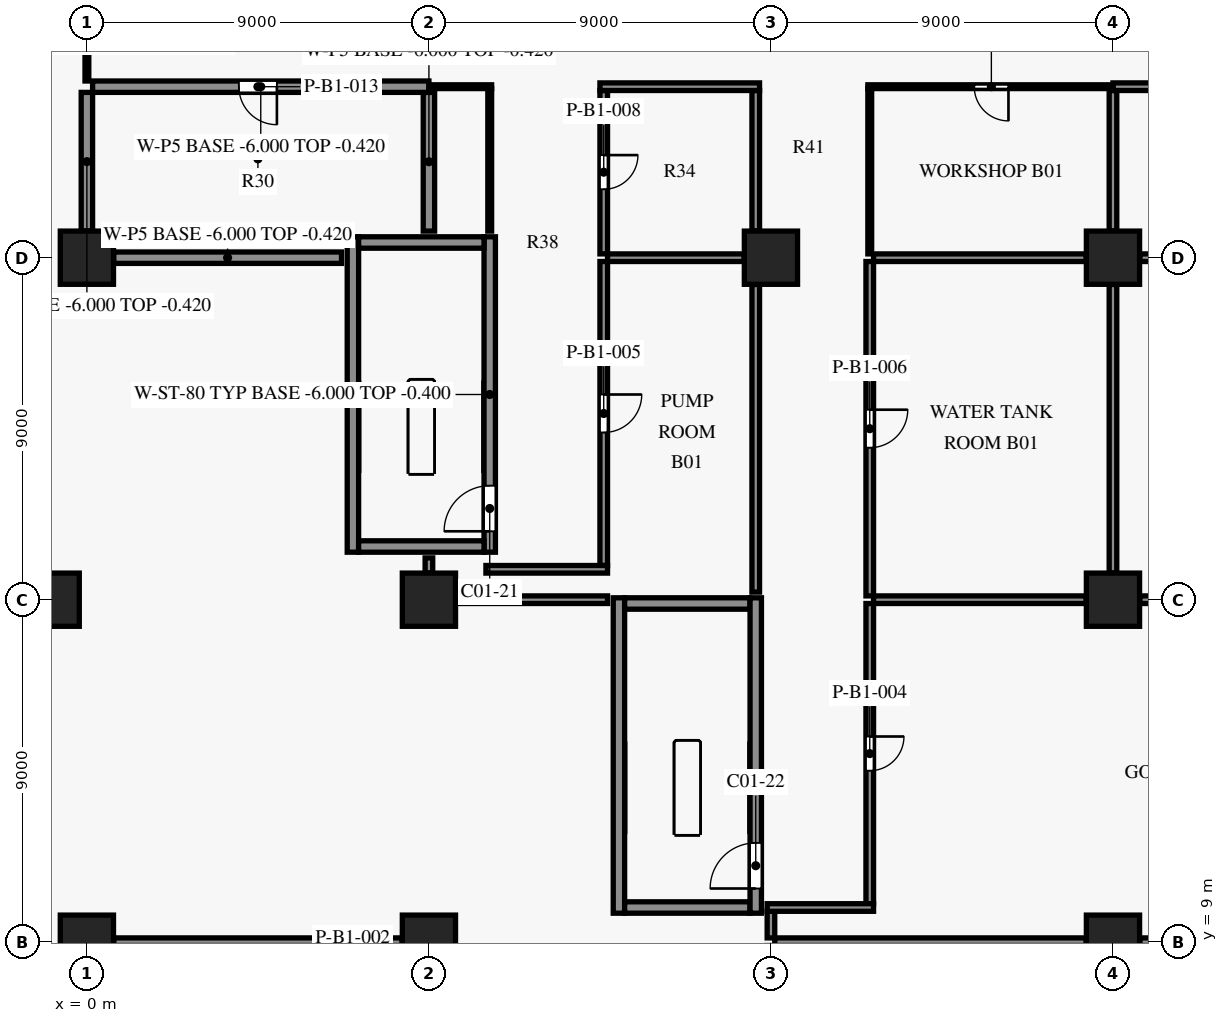
"""IFC4 building model, lengths in metres.
Left out: names, types, materials, properties, quantities, classifications, styles, units other than length and angle.
Written with IfcOpenShell. Run it as: python <this file> out.ifc"""

import sys

from ifc_helpers import new_model, si_unit, direction, frame, frame_2d, origin, origin_2d, place, context, subcontext, project, spatial, rectangle, extrude, element, fill, save


model = new_model("IFC4")
c1 = context("Model", 3, precision=1e-05, world=origin(), true_north=direction((0.0, 1.0)))
c2 = subcontext(c1, "Body", "Model", "MODEL_VIEW")
j1 = project(units=[si_unit("LENGTHUNIT", "METRE"), si_unit("PLANEANGLEUNIT", "RADIAN")], contexts=[c1])
p1 = place(None, origin())
s1 = spatial("IfcSite", under=j1, at=p1, CompositionType="ELEMENT")
p2 = place(p1, origin())
s2 = spatial("IfcBuilding", under=s1, at=p2, CompositionType="ELEMENT")
p3 = place(p2, frame((0.0, 0.0, -6.0)))
s3 = spatial("IfcBuildingStorey", under=s2, at=p3, CompositionType="ELEMENT", Elevation=-6.0)
for number, where, z_axis, x_axis in (
    (1, (27.0, 9.0, 0.0), (0.0, 0.0, 1.0), (1.0, 0.0, 0.0)),
    (2, (27.0, 18.0, 0.0), (0.0, 0.0, 1.0), (1.0, 0.0, 0.0)),
    (3, (27.0, 27.0, 0.0), (0.0, 0.0, 1.0), (1.0, 0.0, 0.0)),
    (4, (0.0, 27.0, 0.0), (0.0, 0.0, 1.0), (1.0, 0.0, 0.0)),
    (5, (-0.9, 18.0, 0.0), (0.0, 0.0, 1.0), (1.0, 0.0, 0.0)),
    (6, (0.0, 9.0, 0.0), (0.0, 0.0, 1.0), (1.0, 0.0, 0.0)),
    (7, (9.0, 9.0, 0.0), (0.0, 0.0, 1.0), (1.0, 0.0, 0.0)),
    (8, (9.0, 18.0, 0.0), (0.0, 0.0, 1.0), (1.0, 0.0, 0.0)),
    (9, (18.0, 27.0, 0.0), (0.0, 0.0, 1.0), (1.0, 0.0, 0.0)),
):
    element("IfcColumn", number, at=place(p3, frame(where, z_axis=z_axis, x_axis=x_axis)), inside=s3, PredefinedType="COLUMN", context=c2, shape_type="SweptSolid", body=[
        extrude(rectangle(XDim=1.4, YDim=1.4, at=origin_2d()), origin(), (0.0, 0.0, 1.0), 6.0),
    ])
for number, where, z_axis, x_axis in (
    (10, (14.15, 9.9, 0.0), (0.0, 0.0, 1.0), (1.0, 0.0, 0.0)),
    (11, (14.15, 17.9, 0.0), (0.0, 0.0, 1.0), (1.0, 0.0, 0.0)),
    (12, (7.15, 19.4, 0.0), (0.0, 0.0, 1.0), (1.0, 0.0, 0.0)),
    (13, (7.15, 27.4, 0.0), (0.0, 0.0, 1.0), (1.0, 0.0, 0.0)),
):
    element("IfcWall", number, at=place(p3, frame(where, z_axis=z_axis, x_axis=x_axis)), inside=s3, PredefinedType="SHEAR", context=c2, shape_type="SweptSolid", body=[
        extrude(rectangle(XDim=3.3, YDim=0.3, at=frame_2d((1.65, 0.0))), origin(), (0.0, 0.0, 1.0), 5.6),
    ])
p4 = place(p3, frame((7.0, 19.25, 0.0), z_axis=(0.0, 0.0, 1.0), x_axis=(0.0, 1.0, 0.0)))
e14 = element("IfcWall", 14, at=p4, inside=s3, PredefinedType="SHEAR", context=c2, shape_type="SweptSolid", body=[
    extrude(rectangle(XDim=8.3, YDim=0.3, at=frame_2d((4.15, 0.0))), origin(), (0.0, 0.0, 1.0), 5.6),
])
p5 = place(p3, frame((10.6, 19.25, 0.0), z_axis=(0.0, 0.0, 1.0), x_axis=(0.0, 1.0, 0.0)))
e15 = element("IfcWall", 15, at=p5, inside=s3, PredefinedType="SHEAR", context=c2, shape_type="SweptSolid", body=[
    extrude(rectangle(XDim=8.3, YDim=0.3, at=frame_2d((4.15, 0.0))), origin(), (0.0, 0.0, 1.0), 5.6),
])
p6 = place(p5, frame((0.55, 0.0, 0.0)))
e16 = element("IfcOpeningElement", 16, at=p6, cuts=e15, PredefinedType="OPENING", context=c2, shape_type="SweptSolid", body=[
    extrude(rectangle(XDim=1.2, YDim=2.2, at=frame_2d((0.6, 1.1))), frame((0.0, 0.16, 0.0), z_axis=(0.0, -1.0, 0.0), x_axis=(1.0, 0.0, 0.0)), (0.0, 0.0, 1.0), 0.32),
])
p7 = place(p3, frame((14.0, 9.75, 0.0), z_axis=(0.0, 0.0, 1.0), x_axis=(0.0, 1.0, 0.0)))
e17 = element("IfcWall", 17, at=p7, inside=s3, PredefinedType="SHEAR", context=c2, shape_type="SweptSolid", body=[
    extrude(rectangle(XDim=8.3, YDim=0.3, at=frame_2d((4.15, 0.0))), origin(), (0.0, 0.0, 1.0), 5.6),
])
p8 = place(p3, frame((17.6, 9.75, 0.0), z_axis=(0.0, 0.0, 1.0), x_axis=(0.0, 1.0, 0.0)))
e18 = element("IfcWall", 18, at=p8, inside=s3, PredefinedType="SHEAR", context=c2, shape_type="SweptSolid", body=[
    extrude(rectangle(XDim=8.3, YDim=0.3, at=frame_2d((4.15, 0.0))), origin(), (0.0, 0.0, 1.0), 5.6),
])
p9 = place(p8, frame((0.65, 0.0, 0.0)))
e19 = element("IfcOpeningElement", 19, at=p9, cuts=e18, PredefinedType="OPENING", context=c2, shape_type="SweptSolid", body=[
    extrude(rectangle(XDim=1.2, YDim=2.2, at=frame_2d((0.6, 1.1))), frame((0.0, 0.16, 0.0), z_axis=(0.0, -1.0, 0.0), x_axis=(1.0, 0.0, 0.0)), (0.0, 0.0, 1.0), 0.32),
])
p10 = place(p3, frame((0.705, 9.0, 0.0), z_axis=(0.0, 0.0, 1.0), x_axis=(1.0, 0.0, 0.0)))
e20 = element("IfcWall", 20, at=p10, inside=s3, PredefinedType="PARTITIONING", context=c2, shape_type="SweptSolid", body=[
    extrude(rectangle(XDim=7.59, YDim=0.2, at=frame_2d((3.795, 0.0))), origin(), (0.0, 0.0, 1.0), 5.58),
])
p11 = place(p3, frame((18.1, 9.0, 0.0), z_axis=(0.0, 0.0, 1.0), x_axis=(1.0, 0.0, 0.0)))
e21 = element("IfcWall", 21, at=p11, inside=s3, PredefinedType="PARTITIONING", context=c2, shape_type="SweptSolid", body=[
    extrude(rectangle(XDim=8.195, YDim=0.2, at=frame_2d((4.097, 0.0))), origin(), (0.0, 0.0, 1.0), 5.58),
])
p12 = place(p3, frame((36.1, 9.0, 0.0), z_axis=(0.0, 0.0, 1.0), x_axis=(-1.0, 0.0, 0.0)))
e22 = element("IfcWall", 22, at=p12, inside=s3, PredefinedType="PARTITIONING", context=c2, shape_type="SweptSolid", body=[
    extrude(rectangle(XDim=8.395, YDim=0.2, at=frame_2d((4.198, 0.0))), origin(), (0.0, 0.0, 1.0), 5.58),
])
p13 = place(p3, frame((18.0, 9.1, 0.0), z_axis=(0.0, 0.0, 1.0), x_axis=(0.0, 1.0, 0.0)))
e23 = element("IfcWall", 23, at=p13, inside=s3, PredefinedType="PARTITIONING", context=c2, shape_type="SweptSolid", body=[
    extrude(rectangle(XDim=0.7, YDim=0.2, at=frame_2d((0.35, 0.0))), origin(), (0.0, 0.0, 1.0), 5.58),
])
p14 = place(p3, frame((20.7, 9.9, 0.0), z_axis=(0.0, 0.0, 1.0), x_axis=(-1.0, 0.0, 0.0)))
e24 = element("IfcWall", 24, at=p14, inside=s3, PredefinedType="PARTITIONING", context=c2, shape_type="SweptSolid", body=[
    extrude(rectangle(XDim=2.8, YDim=0.2, at=frame_2d((1.4, 0.0))), origin(), (0.0, 0.0, 1.0), 5.58),
])
p15 = place(p3, frame((20.6, 17.9, 0.0), z_axis=(0.0, 0.0, 1.0), x_axis=(0.0, -1.0, 0.0)))
e25 = element("IfcWall", 25, at=p15, inside=s3, PredefinedType="PARTITIONING", context=c2, shape_type="SweptSolid", body=[
    extrude(rectangle(XDim=7.9, YDim=0.2, at=frame_2d((3.95, 0.0))), origin(), (0.0, 0.0, 1.0), 5.58),
])
p16 = place(p15, frame((3.5, 0.0, 0.0)))
e26 = element("IfcOpeningElement", 26, at=p16, cuts=e25, PredefinedType="OPENING", context=c2, shape_type="SweptSolid", body=[
    extrude(rectangle(XDim=0.9, YDim=2.1, at=frame_2d((0.45, 1.05))), frame((0.0, 0.11, 0.0), z_axis=(0.0, -1.0, 0.0), x_axis=(1.0, 0.0, 0.0)), (0.0, 0.0, 1.0), 0.22),
])
p17 = place(p3, frame((13.7, 18.0, 0.0), z_axis=(0.0, 0.0, 1.0), x_axis=(-1.0, 0.0, 0.0)))
e27 = element("IfcWall", 27, at=p17, inside=s3, PredefinedType="PARTITIONING", context=c2, shape_type="SweptSolid", body=[
    extrude(rectangle(XDim=3.995, YDim=0.2, at=frame_2d((1.998, 0.0))), origin(), (0.0, 0.0, 1.0), 5.58),
])
p18 = place(p3, frame((20.7, 18.0, 0.0), z_axis=(0.0, 0.0, 1.0), x_axis=(1.0, 0.0, 0.0)))
e28 = element("IfcWall", 28, at=p18, inside=s3, PredefinedType="PARTITIONING", context=c2, shape_type="SweptSolid", body=[
    extrude(rectangle(XDim=5.595, YDim=0.2, at=frame_2d((2.797, 0.0))), origin(), (0.0, 0.0, 1.0), 5.58),
])
p19 = place(p3, frame((27.705, 18.0, 0.0), z_axis=(0.0, 0.0, 1.0), x_axis=(1.0, 0.0, 0.0)))
e29 = element("IfcWall", 29, at=p19, inside=s3, PredefinedType="PARTITIONING", context=c2, shape_type="SweptSolid", body=[
    extrude(rectangle(XDim=7.59, YDim=0.2, at=frame_2d((3.795, 0.0))), origin(), (0.0, 0.0, 1.0), 5.58),
])
p20 = place(p3, frame((17.6, 18.2, 0.0), z_axis=(0.0, 0.0, 1.0), x_axis=(0.0, 1.0, 0.0)))
e30 = element("IfcWall", 30, at=p20, inside=s3, PredefinedType="PARTITIONING", context=c2, shape_type="SweptSolid", body=[
    extrude(rectangle(XDim=8.095, YDim=0.2, at=frame_2d((4.047, 0.0))), origin(), (0.0, 0.0, 1.0), 5.58),
])
p21 = place(p3, frame((9.0, 18.705, 0.0), z_axis=(0.0, 0.0, 1.0), x_axis=(0.0, 1.0, 0.0)))
e31 = element("IfcWall", 31, at=p21, inside=s3, PredefinedType="PARTITIONING", context=c2, shape_type="SweptSolid", body=[
    extrude(rectangle(XDim=0.395, YDim=0.2, at=frame_2d((0.198, 0.0))), origin(), (0.0, 0.0, 1.0), 5.58),
])
p22 = place(p3, frame((13.7, 18.8, 0.0), z_axis=(0.0, 0.0, 1.0), x_axis=(-1.0, 0.0, 0.0)))
e32 = element("IfcWall", 32, at=p22, inside=s3, PredefinedType="PARTITIONING", context=c2, shape_type="SweptSolid", body=[
    extrude(rectangle(XDim=3.2, YDim=0.2, at=frame_2d((1.6, 0.0))), origin(), (0.0, 0.0, 1.0), 5.58),
])
p23 = place(p3, frame((27.0, 26.295, 0.0), z_axis=(0.0, 0.0, 1.0), x_axis=(0.0, -1.0, 0.0)))
e33 = element("IfcWall", 33, at=p23, inside=s3, PredefinedType="PARTITIONING", context=c2, shape_type="SweptSolid", body=[
    extrude(rectangle(XDim=7.59, YDim=0.2, at=frame_2d((3.795, 0.0))), origin(), (0.0, 0.0, 1.0), 5.58),
])
p24 = place(p3, frame((13.6, 26.9, 0.0), z_axis=(0.0, 0.0, 1.0), x_axis=(0.0, -1.0, 0.0)))
e34 = element("IfcWall", 34, at=p24, inside=s3, PredefinedType="PARTITIONING", context=c2, shape_type="SweptSolid", body=[
    extrude(rectangle(XDim=8.0, YDim=0.2, at=frame_2d((4.0, 0.0))), origin(), (0.0, 0.0, 1.0), 5.58),
])
p25 = place(p24, frame((3.5, 0.0, 0.0)))
e35 = element("IfcOpeningElement", 35, at=p25, cuts=e34, PredefinedType="OPENING", context=c2, shape_type="SweptSolid", body=[
    extrude(rectangle(XDim=1.0, YDim=2.1, at=frame_2d((0.5, 1.05))), frame((0.0, 0.11, 0.0), z_axis=(0.0, -1.0, 0.0), x_axis=(1.0, 0.0, 0.0)), (0.0, 0.0, 1.0), 0.22),
])
p26 = place(p3, frame((20.6, 26.9, 0.0), z_axis=(0.0, 0.0, 1.0), x_axis=(0.0, -1.0, 0.0)))
e36 = element("IfcWall", 36, at=p26, inside=s3, PredefinedType="PARTITIONING", context=c2, shape_type="SweptSolid", body=[
    extrude(rectangle(XDim=8.8, YDim=0.2, at=frame_2d((4.4, 0.0))), origin(), (0.0, 0.0, 1.0), 5.58),
])
p27 = place(p26, frame((3.9, 0.0, 0.0)))
e37 = element("IfcOpeningElement", 37, at=p27, cuts=e36, PredefinedType="OPENING", context=c2, shape_type="SweptSolid", body=[
    extrude(rectangle(XDim=1.0, YDim=2.1, at=frame_2d((0.5, 1.05))), frame((0.0, 0.11, 0.0), z_axis=(0.0, -1.0, 0.0), x_axis=(1.0, 0.0, 0.0)), (0.0, 0.0, 1.0), 0.22),
])
p28 = place(p3, frame((6.7, 27.0, 0.0), z_axis=(0.0, 0.0, 1.0), x_axis=(-1.0, 0.0, 0.0)))
e38 = element("IfcWall", 38, at=p28, inside=s3, PredefinedType="PARTITIONING", context=c2, shape_type="SweptSolid", body=[
    extrude(rectangle(XDim=5.995, YDim=0.3, at=frame_2d((2.998, 0.0))), origin(), (0.0, 0.0, 1.0), 5.58),
])
p29 = place(p3, frame((13.7, 27.0, 0.0), z_axis=(0.0, 0.0, 1.0), x_axis=(1.0, 0.0, 0.0)))
e39 = element("IfcWall", 39, at=p29, inside=s3, PredefinedType="PARTITIONING", context=c2, shape_type="SweptSolid", body=[
    extrude(rectangle(XDim=3.595, YDim=0.2, at=frame_2d((1.797, 0.0))), origin(), (0.0, 0.0, 1.0), 5.58),
])
p30 = place(p3, frame((20.7, 27.0, 0.0), z_axis=(0.0, 0.0, 1.0), x_axis=(1.0, 0.0, 0.0)))
e40 = element("IfcWall", 40, at=p30, inside=s3, PredefinedType="PARTITIONING", context=c2, shape_type="SweptSolid", body=[
    extrude(rectangle(XDim=5.595, YDim=0.2, at=frame_2d((2.797, 0.0))), origin(), (0.0, 0.0, 1.0), 5.58),
])
p31 = place(p3, frame((35.295, 27.0, 0.0), z_axis=(0.0, 0.0, 1.0), x_axis=(-1.0, 0.0, 0.0)))
e41 = element("IfcWall", 41, at=p31, inside=s3, PredefinedType="PARTITIONING", context=c2, shape_type="SweptSolid", body=[
    extrude(rectangle(XDim=7.59, YDim=0.2, at=frame_2d((3.795, 0.0))), origin(), (0.0, 0.0, 1.0), 5.58),
])
p32 = place(p3, frame((10.6, 27.7, 0.0), z_axis=(0.0, 0.0, 1.0), x_axis=(0.0, 1.0, 0.0)))
e42 = element("IfcWall", 42, at=p32, inside=s3, PredefinedType="PARTITIONING", context=c2, shape_type="SweptSolid", body=[
    extrude(rectangle(XDim=3.75, YDim=0.1, at=frame_2d((1.875, 0.0))), origin(), (0.0, 0.0, 1.0), 5.58),
])
p33 = place(p3, frame((0.0, 27.705, 0.0), z_axis=(0.0, 0.0, 1.0), x_axis=(0.0, 1.0, 0.0)))
e43 = element("IfcWall", 43, at=p33, inside=s3, PredefinedType="PARTITIONING", context=c2, shape_type="SweptSolid", body=[
    extrude(rectangle(XDim=3.645, YDim=0.3, at=frame_2d((1.823, 0.0))), origin(), (0.0, 0.0, 1.0), 5.58),
])
for number, where, z_axis, x_axis in (
    (44, (17.6, 27.705, 0.0), (0.0, 0.0, 1.0), (0.0, 1.0, 0.0)),
    (45, (27.0, 27.705, 0.0), (0.0, 0.0, 1.0), (0.0, 1.0, 0.0)),
):
    element("IfcWall", number, at=place(p3, frame(where, z_axis=z_axis, x_axis=x_axis)), inside=s3, PredefinedType="PARTITIONING", context=c2, shape_type="SweptSolid", body=[
        extrude(rectangle(XDim=3.695, YDim=0.2, at=frame_2d((1.847, 0.0))), origin(), (0.0, 0.0, 1.0), 5.58),
    ])
p34 = place(p3, frame((9.0, 31.35, 0.0), z_axis=(0.0, 0.0, 1.0), x_axis=(0.0, -1.0, 0.0)))
e46 = element("IfcWall", 46, at=p34, inside=s3, PredefinedType="PARTITIONING", context=c2, shape_type="SweptSolid", body=[
    extrude(rectangle(XDim=3.65, YDim=0.3, at=frame_2d((1.825, 0.0))), origin(), (0.0, 0.0, 1.0), 5.58),
])
p35 = place(p3, frame((13.6, 31.4, 0.0), z_axis=(0.0, 0.0, 1.0), x_axis=(0.0, -1.0, 0.0)))
e47 = element("IfcWall", 47, at=p35, inside=s3, PredefinedType="PARTITIONING", context=c2, shape_type="SweptSolid", body=[
    extrude(rectangle(XDim=4.3, YDim=0.2, at=frame_2d((2.15, 0.0))), origin(), (0.0, 0.0, 1.0), 5.58),
])
p36 = place(p35, frame((1.7, 0.0, 0.0)))
e48 = element("IfcOpeningElement", 48, at=p36, cuts=e47, PredefinedType="OPENING", context=c2, shape_type="SweptSolid", body=[
    extrude(rectangle(XDim=0.9, YDim=2.1, at=frame_2d((0.45, 1.05))), frame((0.0, 0.11, 0.0), z_axis=(0.0, -1.0, 0.0), x_axis=(1.0, 0.0, 0.0)), (0.0, 0.0, 1.0), 0.22),
])
p37 = place(p3, frame((20.6, 31.45, 0.0), z_axis=(0.0, 0.0, 1.0), x_axis=(0.0, -1.0, 0.0)))
e49 = element("IfcWall", 49, at=p37, inside=s3, PredefinedType="PARTITIONING", context=c2, shape_type="SweptSolid", body=[
    extrude(rectangle(XDim=4.35, YDim=0.1, at=frame_2d((2.175, 0.0))), origin(), (0.0, 0.0, 1.0), 5.58),
])
p38 = place(p3, frame((9.0, 31.5, 0.0), z_axis=(0.0, 0.0, 1.0), x_axis=(-1.0, 0.0, 0.0)))
e50 = element("IfcWall", 50, at=p38, inside=s3, PredefinedType="PARTITIONING", context=c2, shape_type="SweptSolid", body=[
    extrude(rectangle(XDim=8.85, YDim=0.3, at=frame_2d((4.425, 0.0))), origin(), (0.0, 0.0, 1.0), 5.58),
])
p39 = place(p38, frame((4.0, 0.0, 0.0)))
e51 = element("IfcOpeningElement", 51, at=p39, cuts=e50, PredefinedType="OPENING", context=c2, shape_type="SweptSolid", body=[
    extrude(rectangle(XDim=1.0, YDim=2.1, at=frame_2d((0.5, 1.05))), frame((0.0, 0.16, 0.0), z_axis=(0.0, -1.0, 0.0), x_axis=(1.0, 0.0, 0.0)), (0.0, 0.0, 1.0), 0.32),
])
p40 = place(p3, frame((10.65, 31.5, 0.0), z_axis=(0.0, 0.0, 1.0), x_axis=(-1.0, 0.0, 0.0)))
e52 = element("IfcWall", 52, at=p40, inside=s3, PredefinedType="PARTITIONING", context=c2, shape_type="SweptSolid", body=[
    extrude(rectangle(XDim=1.65, YDim=0.1, at=frame_2d((0.825, 0.0))), origin(), (0.0, 0.0, 1.0), 5.58),
])
p41 = place(p3, frame((17.7, 31.5, 0.0), z_axis=(0.0, 0.0, 1.0), x_axis=(-1.0, 0.0, 0.0)))
e53 = element("IfcWall", 53, at=p41, inside=s3, PredefinedType="PARTITIONING", context=c2, shape_type="SweptSolid", body=[
    extrude(rectangle(XDim=4.2, YDim=0.2, at=frame_2d((2.1, 0.0))), origin(), (0.0, 0.0, 1.0), 5.58),
])
p42 = place(p3, frame((27.0, 31.5, 0.0), z_axis=(0.0, 0.0, 1.0), x_axis=(-1.0, 0.0, 0.0)))
e54 = element("IfcWall", 54, at=p42, inside=s3, PredefinedType="PARTITIONING", context=c2, shape_type="SweptSolid", body=[
    extrude(rectangle(XDim=6.45, YDim=0.1, at=frame_2d((3.225, 0.0))), origin(), (0.0, 0.0, 1.0), 5.58),
])
p43 = place(p42, frame((2.75, 0.0, 0.0)))
e55 = element("IfcOpeningElement", 55, at=p43, cuts=e54, PredefinedType="OPENING", context=c2, shape_type="SweptSolid", body=[
    extrude(rectangle(XDim=0.9, YDim=2.1, at=frame_2d((0.45, 1.05))), frame((0.0, 0.06, 0.0), z_axis=(0.0, -1.0, 0.0), x_axis=(1.0, 0.0, 0.0)), (0.0, 0.0, 1.0), 0.12),
])
p44 = place(p3, frame((36.0, 31.5, 0.0), z_axis=(0.0, 0.0, 1.0), x_axis=(-1.0, 0.0, 0.0)))
e56 = element("IfcWall", 56, at=p44, inside=s3, PredefinedType="PARTITIONING", context=c2, shape_type="SweptSolid", body=[
    extrude(rectangle(XDim=9.0, YDim=0.2, at=frame_2d((4.5, 0.0))), origin(), (0.0, 0.0, 1.0), 5.58),
])
p45 = place(p44, frame((4.05, 0.0, 0.0)))
e57 = element("IfcOpeningElement", 57, at=p45, cuts=e56, PredefinedType="OPENING", context=c2, shape_type="SweptSolid", body=[
    extrude(rectangle(XDim=0.9, YDim=2.1, at=frame_2d((0.45, 1.05))), frame((0.0, 0.11, 0.0), z_axis=(0.0, -1.0, 0.0), x_axis=(1.0, 0.0, 0.0)), (0.0, 0.0, 1.0), 0.22),
])
p46 = place(p3, frame((0.0, 31.65, 0.0), z_axis=(0.0, 0.0, 1.0), x_axis=(0.0, 1.0, 0.0)))
e58 = element("IfcWall", 58, at=p46, inside=s3, PredefinedType="PARTITIONING", context=c2, shape_type="SweptSolid", body=[
    extrude(rectangle(XDim=4.255, YDim=0.1, at=frame_2d((2.127, 0.0))), origin(), (0.0, 0.0, 1.0), 5.58),
])
p47 = place(p6, origin())
e59 = element("IfcDoor", 59, at=p47, inside=s3, OperationType="SINGLE_SWING_RIGHT", PredefinedType="DOOR", context=c2, shape_type="SweptSolid", body=[
    extrude(rectangle(XDim=1.2, YDim=2.2, at=frame_2d((0.6, 1.1))), frame((0.0, 0.025, 0.0), z_axis=(0.0, -1.0, 0.0), x_axis=(1.0, 0.0, 0.0)), (0.0, 0.0, 1.0), 0.05),
])
fill(e16, e59)
p48 = place(p9, origin())
e60 = element("IfcDoor", 60, at=p48, inside=s3, OperationType="SINGLE_SWING_LEFT", PredefinedType="DOOR", context=c2, shape_type="SweptSolid", body=[
    extrude(rectangle(XDim=1.2, YDim=2.2, at=frame_2d((0.6, 1.1))), frame((0.0, 0.025, 0.0), z_axis=(0.0, -1.0, 0.0), x_axis=(1.0, 0.0, 0.0)), (0.0, 0.0, 1.0), 0.05),
])
fill(e19, e60)
p49 = place(p16, origin())
e61 = element("IfcDoor", 61, at=p49, inside=s3, OperationType="SINGLE_SWING_RIGHT", PredefinedType="DOOR", context=c2, shape_type="SweptSolid", body=[
    extrude(rectangle(XDim=0.9, YDim=2.1, at=frame_2d((0.45, 1.05))), frame((0.0, 0.025, 0.0), z_axis=(0.0, -1.0, 0.0), x_axis=(1.0, 0.0, 0.0)), (0.0, 0.0, 1.0), 0.05),
])
fill(e26, e61)
p50 = place(p25, origin())
e62 = element("IfcDoor", 62, at=p50, inside=s3, OperationType="SINGLE_SWING_LEFT", PredefinedType="DOOR", context=c2, shape_type="SweptSolid", body=[
    extrude(rectangle(XDim=1.0, YDim=2.1, at=frame_2d((0.5, 1.05))), frame((0.0, 0.025, 0.0), z_axis=(0.0, -1.0, 0.0), x_axis=(1.0, 0.0, 0.0)), (0.0, 0.0, 1.0), 0.05),
])
fill(e35, e62)
p51 = place(p27, origin())
e63 = element("IfcDoor", 63, at=p51, inside=s3, OperationType="SINGLE_SWING_LEFT", PredefinedType="DOOR", context=c2, shape_type="SweptSolid", body=[
    extrude(rectangle(XDim=1.0, YDim=2.1, at=frame_2d((0.5, 1.05))), frame((0.0, 0.025, 0.0), z_axis=(0.0, -1.0, 0.0), x_axis=(1.0, 0.0, 0.0)), (0.0, 0.0, 1.0), 0.05),
])
fill(e37, e63)
p52 = place(p36, origin())
e64 = element("IfcDoor", 64, at=p52, inside=s3, OperationType="SINGLE_SWING_LEFT", PredefinedType="DOOR", context=c2, shape_type="SweptSolid", body=[
    extrude(rectangle(XDim=0.9, YDim=2.1, at=frame_2d((0.45, 1.05))), frame((0.0, 0.025, 0.0), z_axis=(0.0, -1.0, 0.0), x_axis=(1.0, 0.0, 0.0)), (0.0, 0.0, 1.0), 0.05),
])
fill(e48, e64)
p53 = place(p39, origin())
e65 = element("IfcDoor", 65, at=p53, inside=s3, OperationType="SINGLE_SWING_RIGHT", PredefinedType="DOOR", context=c2, shape_type="SweptSolid", body=[
    extrude(rectangle(XDim=1.0, YDim=2.1, at=frame_2d((0.5, 1.05))), frame((0.0, 0.025, 0.0), z_axis=(0.0, -1.0, 0.0), x_axis=(1.0, 0.0, 0.0)), (0.0, 0.0, 1.0), 0.05),
])
fill(e51, e65)
p54 = place(p43, origin())
e66 = element("IfcDoor", 66, at=p54, inside=s3, OperationType="SINGLE_SWING_RIGHT", PredefinedType="DOOR", context=c2, shape_type="SweptSolid", body=[
    extrude(rectangle(XDim=0.9, YDim=2.1, at=frame_2d((0.45, 1.05))), frame((0.0, 0.025, 0.0), z_axis=(0.0, -1.0, 0.0), x_axis=(1.0, 0.0, 0.0)), (0.0, 0.0, 1.0), 0.05),
])
fill(e55, e66)
save(model, sys.argv[1])
